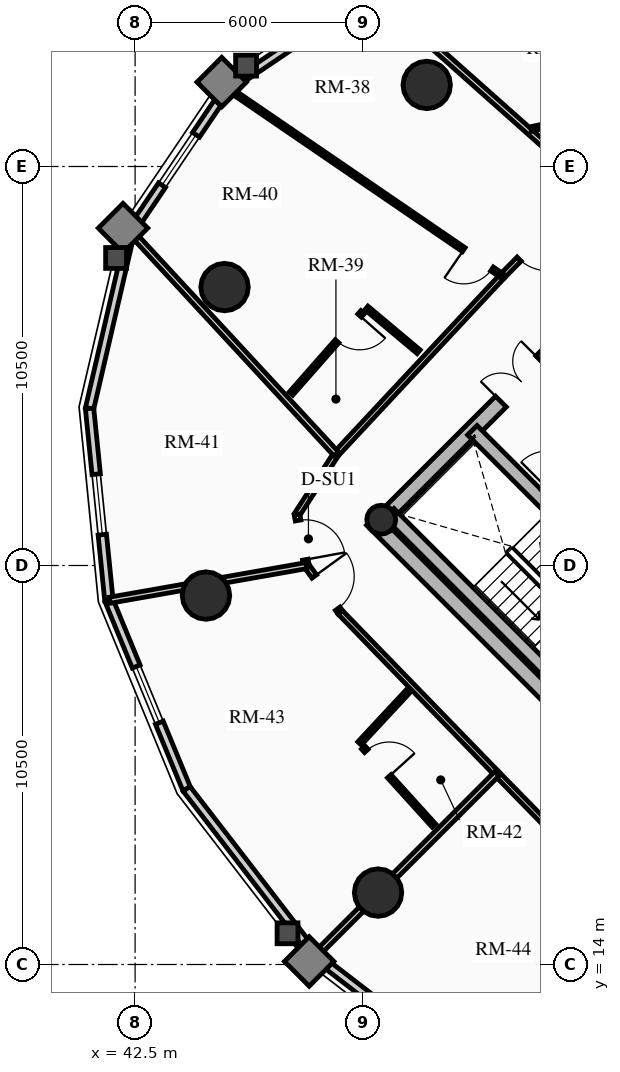
"""IFC4 building model, lengths in metres.
Left out: names, types, materials, properties, quantities, classifications, styles, units other than length and angle.
Written with IfcOpenShell. Run it as: python <this file> out.ifc"""

import sys

from ifc_helpers import new_model, si_unit, direction, frame, frame_2d, origin, origin_2d, place, context, subcontext, project, spatial, rectangle, circle, hollow_circle, extrude, source, transform, mapped, element, fill, save


model = new_model("IFC4")
c1 = context("Model", 3, precision=1e-05, world=origin(), true_north=direction((0.0, 1.0)))
c2 = subcontext(c1, "Body", "Model", "MODEL_VIEW")
j1 = project(units=[si_unit("LENGTHUNIT", "METRE"), si_unit("PLANEANGLEUNIT", "RADIAN")], contexts=[c1])
p1 = place(None, origin())
s1 = spatial("IfcSite", under=j1, at=p1, CompositionType="ELEMENT")
p2 = place(p1, origin())
s2 = spatial("IfcBuilding", under=s1, at=p2, CompositionType="ELEMENT")
p3 = place(p2, frame((0.0, 0.0, 151.6)))
s3 = spatial("IfcBuildingStorey", under=s2, at=p3, CompositionType="ELEMENT", Elevation=151.6)
p4 = place(p3, frame((58.702, 15.732, 0.0), z_axis=(0.0, 0.0, 1.0), x_axis=(-0.707106781187, 0.707106781187, 0.0)))
e1 = element("IfcWall", 1, at=p4, inside=s3, PredefinedType="SHEAR", context=c2, shape_type="SweptSolid", body=[
    extrude(rectangle(XDim=14.1, YDim=0.4, at=frame_2d((7.05, 0.0))), origin(), (0.0, 0.0, 1.0), 2.91),
])
p5 = place(p3, frame((48.873, 25.561, 0.0), z_axis=(0.0, 0.0, 1.0), x_axis=(0.707106781187, 0.707106781187, 0.0)))
e2 = element("IfcWall", 2, at=p5, inside=s3, PredefinedType="SHEAR", context=c2, shape_type="SweptSolid", body=[
    extrude(rectangle(XDim=10.7, YDim=0.4, at=frame_2d((5.35, 0.0))), origin(), (0.0, 0.0, 1.0), 2.91),
])
m1 = source(origin(), c2, "Body", "SweptSolid", [
    extrude(rectangle(XDim=1.5, YDim=2.02, at=frame_2d((0.75, 1.01))), frame((0.0, 0.21, 0.0), z_axis=(0.0, -1.0, 0.0), x_axis=(1.0, 0.0, 0.0)), (0.0, 0.0, 1.0), 0.42),
])
p6 = place(p5, frame((4.6, 0.0, 0.0)))
e3 = element("IfcOpeningElement", 3, at=p6, cuts=e2, PredefinedType="OPENING", context=c2, shape_type="MappedRepresentation", body=[
    mapped(m1, transform((0.0, 0.0, 0.0), x_axis=(1.0, 0.0, 0.0), y_axis=(0.0, 1.0, 0.0), z_axis=(0.0, 0.0, 1.0), scale=1.0)),
])
p7 = place(p3, frame((61.06, 18.373, 0.0), z_axis=(0.0, 0.0, 1.0), x_axis=(-0.707106781187, 0.707106781187, 0.0)))
e4 = element("IfcWall", 4, at=p7, inside=s3, PredefinedType="SHEAR", context=c2, shape_type="SweptSolid", body=[
    extrude(rectangle(XDim=13.7, YDim=0.35, at=frame_2d((6.85, 0.0))), origin(), (0.0, 0.0, 1.0), 2.91),
])
m2 = source(origin(), c2, "Body", "SweptSolid", [
    extrude(rectangle(XDim=1.1, YDim=2.015, at=frame_2d((0.55, 1.007))), frame((0.0, 0.185, 0.0), z_axis=(0.0, -1.0, 0.0), x_axis=(1.0, 0.0, 0.0)), (0.0, 0.0, 1.0), 0.37),
])
p8 = place(p7, frame((4.85, 0.0, 0.0)))
e5 = element("IfcOpeningElement", 5, at=p8, cuts=e4, PredefinedType="OPENING", context=c2, shape_type="MappedRepresentation", body=[
    mapped(m2, transform((0.0, 0.0, 0.0), x_axis=(1.0, 0.0, 0.0), y_axis=(0.0, 1.0, 0.0), z_axis=(0.0, 0.0, 1.0), scale=1.0)),
])
p9 = place(p7, frame((0.625, 0.0, 0.0)))
e6 = element("IfcOpeningElement", 6, at=p9, cuts=e4, PredefinedType="OPENING", context=c2, shape_type="MappedRepresentation", body=[
    mapped(m2, transform((0.0, 0.0, 0.0), x_axis=(1.0, 0.0, 0.0), y_axis=(0.0, 1.0, 0.0), z_axis=(0.0, 0.0, 1.0), scale=1.0)),
])
p10 = place(p7, frame((2.625, 0.0, 0.0)))
e7 = element("IfcOpeningElement", 7, at=p10, cuts=e4, PredefinedType="OPENING", context=c2, shape_type="MappedRepresentation", body=[
    mapped(m2, transform((0.0, 0.0, 0.0), x_axis=(1.0, 0.0, 0.0), y_axis=(0.0, 1.0, 0.0), z_axis=(0.0, 0.0, 1.0), scale=1.0)),
])
m3 = source(origin(), c2, "Body", "SweptSolid", [
    extrude(rectangle(XDim=1.15, YDim=2.02, at=frame_2d((0.575, 1.01))), frame((0.0, 0.185, 0.0), z_axis=(0.0, -1.0, 0.0), x_axis=(1.0, 0.0, 0.0)), (0.0, 0.0, 1.0), 0.37),
])
p11 = place(p7, frame((7.27, 0.0, 0.0)))
e8 = element("IfcOpeningElement", 8, at=p11, cuts=e4, PredefinedType="OPENING", context=c2, shape_type="MappedRepresentation", body=[
    mapped(m3, transform((0.0, 0.0, 0.0), x_axis=(1.0, 0.0, 0.0), y_axis=(0.0, 1.0, 0.0), z_axis=(0.0, 0.0, 1.0), scale=1.0)),
])
p12 = place(p3, frame((53.922, 21.141, 0.0), z_axis=(0.0, 0.0, 1.0), x_axis=(-0.707106781187, 0.707106781187, 0.0)))
e9 = element("IfcWall", 9, at=p12, inside=s3, PredefinedType="SHEAR", context=c2, shape_type="SweptSolid", body=[
    extrude(rectangle(XDim=6.695, YDim=0.35, at=frame_2d((3.348, 0.0))), origin(), (0.0, 0.0, 1.0), 2.91),
])
p13 = place(p3, frame((48.976, 25.706, 0.0), z_axis=(0.0, 0.0, 1.0), x_axis=(0.707106781187, 0.707106781187, 0.0)))
e10 = element("IfcColumn", 10, at=p13, inside=s3, PredefinedType="COLUMN", context=c2, shape_type="SweptSolid", body=[
    extrude(hollow_circle(Radius=0.38, WallThickness=0.032, at=origin_2d()), origin(), (0.0, 0.0, 1.0), 2.91),
])
for number, where, z_axis, x_axis in (
    (11, (50.173, 37.146, 0.0), (0.0, 0.0, 1.0), (1.0, 0.0, 0.0)),
    (12, (44.854, 31.827, 0.0), (0.0, 0.0, 1.0), (1.0, 0.0, 0.0)),
    (13, (44.365, 23.709, 0.0), (0.0, 0.0, 1.0), (1.0, 0.0, 0.0)),
    (14, (48.893, 15.893, 0.0), (0.0, 0.0, 1.0), (1.0, 0.0, 0.0)),
):
    element("IfcColumn", number, at=place(p3, frame(where, z_axis=z_axis, x_axis=x_axis)), inside=s3, PredefinedType="USERDEFINED", context=c2, shape_type="SweptSolid", body=[
        extrude(circle(Radius=0.625, at=origin_2d()), origin(), (0.0, 0.0, 1.0), 2.91),
    ])
p14 = place(p3, frame((44.935, 37.065, 0.0), z_axis=(0.0, 0.0, 1.0), x_axis=(0.828739009952, 0.559635286042, 0.0)))
e15 = element("IfcWall", 15, at=p14, inside=s3, PredefinedType="SOLIDWALL", context=c2, shape_type="SweptSolid", body=[
    extrude(rectangle(XDim=4.569, YDim=0.22, at=frame_2d((2.284, 0.0))), origin(), (0.0, 0.0, 1.0), 2.245),
])
p15 = place(p3, frame((42.378, 33.279, 0.0), z_axis=(0.0, 0.0, 1.0), x_axis=(0.559635286042, 0.828739009952, 0.0)))
e16 = element("IfcWall", 16, at=p15, inside=s3, PredefinedType="SOLIDWALL", context=c2, shape_type="SweptSolid", body=[
    extrude(rectangle(XDim=4.569, YDim=0.22, at=frame_2d((2.284, 0.0))), origin(), (0.0, 0.0, 1.0), 2.245),
])
m4 = source(origin(), c2, "Body", "SweptSolid", [
    extrude(rectangle(XDim=1.6, YDim=1.3, at=frame_2d((0.8, 0.65))), frame((0.0, 0.12, 0.0), z_axis=(0.0, -1.0, 0.0), x_axis=(1.0, 0.0, 0.0)), (0.0, 0.0, 1.0), 0.24),
])
p16 = place(p15, frame((1.484, 0.0, 0.65)))
e17 = element("IfcOpeningElement", 17, at=p16, cuts=e16, PredefinedType="OPENING", context=c2, shape_type="MappedRepresentation", body=[
    mapped(m4, transform((0.0, 0.0, 0.0), x_axis=(1.0, 0.0, 0.0), y_axis=(0.0, 1.0, 0.0), z_axis=(0.0, 0.0, 1.0), scale=1.0)),
])
p17 = place(p3, frame((41.302, 28.633, 0.0), z_axis=(0.0, 0.0, 1.0), x_axis=(0.225659540039, 0.974206226622, 0.0)))
e18 = element("IfcWall", 18, at=p17, inside=s3, PredefinedType="SOLIDWALL", context=c2, shape_type="SweptSolid", body=[
    extrude(rectangle(XDim=4.769, YDim=0.22, at=frame_2d((2.385, 0.0))), origin(), (0.0, 0.0, 1.0), 2.245),
])
p18 = place(p3, frame((41.811, 23.582, 0.0), z_axis=(0.0, 0.0, 1.0), x_axis=(-0.100279889424, 0.994959267396, 0.0)))
e19 = element("IfcWall", 19, at=p18, inside=s3, PredefinedType="SOLIDWALL", context=c2, shape_type="SweptSolid", body=[
    extrude(rectangle(XDim=5.076, YDim=0.22, at=frame_2d((2.538, 0.0))), origin(), (0.0, 0.0, 1.0), 2.245),
])
p19 = place(p18, frame((1.738, 0.0, 0.65)))
e20 = element("IfcOpeningElement", 20, at=p19, cuts=e19, PredefinedType="OPENING", context=c2, shape_type="MappedRepresentation", body=[
    mapped(m4, transform((0.0, 0.0, 0.0), x_axis=(1.0, 0.0, 0.0), y_axis=(0.0, 1.0, 0.0), z_axis=(0.0, 0.0, 1.0), scale=1.0)),
])
p20 = place(p3, frame((43.856, 18.622, 0.0), z_axis=(0.0, 0.0, 1.0), x_axis=(-0.38111364655, 0.924528197738, 0.0)))
e21 = element("IfcWall", 21, at=p20, inside=s3, PredefinedType="SOLIDWALL", context=c2, shape_type="SweptSolid", body=[
    extrude(rectangle(XDim=5.366, YDim=0.22, at=frame_2d((2.683, 0.0))), origin(), (0.0, 0.0, 1.0), 2.245),
])
p21 = place(p20, frame((1.883, 0.0, 0.65)))
e22 = element("IfcOpeningElement", 22, at=p21, cuts=e21, PredefinedType="OPENING", context=c2, shape_type="MappedRepresentation", body=[
    mapped(m4, transform((0.0, 0.0, 0.0), x_axis=(1.0, 0.0, 0.0), y_axis=(0.0, 1.0, 0.0), z_axis=(0.0, 0.0, 1.0), scale=1.0)),
])
p22 = place(p3, frame((47.236, 14.236, 0.0), z_axis=(0.0, 0.0, 1.0), x_axis=(-0.610543584779, 0.791982658323, 0.0)))
e23 = element("IfcWall", 23, at=p22, inside=s3, PredefinedType="SOLIDWALL", context=c2, shape_type="SweptSolid", body=[
    extrude(rectangle(XDim=5.537, YDim=0.22, at=frame_2d((2.769, 0.0))), origin(), (0.0, 0.0, 1.0), 2.245),
])
p23 = place(p3, frame((51.622, 10.856, 0.0), z_axis=(0.0, 0.0, 1.0), x_axis=(-0.791982658323, 0.610543584779, 0.0)))
e24 = element("IfcWall", 24, at=p23, inside=s3, PredefinedType="SOLIDWALL", context=c2, shape_type="SweptSolid", body=[
    extrude(rectangle(XDim=5.537, YDim=0.22, at=frame_2d((2.769, 0.0))), origin(), (0.0, 0.0, 1.0), 2.245),
])
p24 = place(p23, frame((1.968, 0.0, 0.65)))
e25 = element("IfcOpeningElement", 25, at=p24, cuts=e24, PredefinedType="OPENING", context=c2, shape_type="MappedRepresentation", body=[
    mapped(m4, transform((0.0, 0.0, 0.0), x_axis=(1.0, 0.0, 0.0), y_axis=(0.0, 1.0, 0.0), z_axis=(0.0, 0.0, 1.0), scale=1.0)),
])
p25 = place(p3, frame((54.501, 34.479, 0.0), z_axis=(0.0, 0.0, 1.0), x_axis=(-0.70346073929, -0.710734119258, 0.0)))
e26 = element("IfcWall", 26, at=p25, inside=s3, PredefinedType="PARTITIONING", context=c2, shape_type="SweptSolid", body=[
    extrude(rectangle(XDim=3.323, YDim=0.15, at=frame_2d((1.662, 0.0))), origin(), (0.0, 0.0, 1.0), 2.245),
])
m5 = source(origin(), c2, "Body", "SweptSolid", [
    extrude(rectangle(XDim=1.05, YDim=2.015, at=frame_2d((0.525, 1.007))), frame((0.0, 0.085, 0.0), z_axis=(0.0, -1.0, 0.0), x_axis=(1.0, 0.0, 0.0)), (0.0, 0.0, 1.0), 0.17),
])
p26 = place(p25, frame((1.645, 0.0, 0.0)))
e27 = element("IfcOpeningElement", 27, at=p26, cuts=e26, PredefinedType="OPENING", context=c2, shape_type="MappedRepresentation", body=[
    mapped(m5, transform((0.0, 0.0, 0.0), x_axis=(1.0, 0.0, 0.0), y_axis=(0.0, 1.0, 0.0), z_axis=(0.0, 0.0, 1.0), scale=1.0)),
])
p27 = place(p3, frame((52.163, 32.117, 0.0), z_axis=(0.0, 0.0, 1.0), x_axis=(-0.682485296115, -0.730899323154, 0.0)))
e28 = element("IfcWall", 28, at=p27, inside=s3, PredefinedType="PARTITIONING", context=c2, shape_type="SweptSolid", body=[
    extrude(rectangle(XDim=6.404, YDim=0.15, at=frame_2d((3.202, 0.0))), origin(), (0.0, 0.0, 1.0), 2.245),
])
p28 = place(p3, frame((47.792, 27.436, 0.0), z_axis=(0.0, 0.0, 1.0), x_axis=(-0.543086162542, -0.839676973637, 0.0)))
e29 = element("IfcWall", 29, at=p28, inside=s3, PredefinedType="PARTITIONING", context=c2, shape_type="SweptSolid", body=[
    extrude(rectangle(XDim=1.901, YDim=0.15, at=frame_2d((0.95, 0.0))), origin(), (0.0, 0.0, 1.0), 2.245),
])
p29 = place(p3, frame((46.76, 25.84, 0.0), z_axis=(0.0, 0.0, 1.0), x_axis=(0.181230731673, -0.983440604153, 0.0)))
e30 = element("IfcWall", 30, at=p29, inside=s3, PredefinedType="PARTITIONING", context=c2, shape_type="SweptSolid", body=[
    extrude(rectangle(XDim=1.365, YDim=0.15, at=frame_2d((0.682, 0.0))), origin(), (0.0, 0.0, 1.0), 2.245),
])
p30 = place(p29, frame((0.157, 0.0, 0.0)))
e31 = element("IfcOpeningElement", 31, at=p30, cuts=e30, PredefinedType="OPENING", context=c2, shape_type="MappedRepresentation", body=[
    mapped(m5, transform((0.0, 0.0, 0.0), x_axis=(1.0, 0.0, 0.0), y_axis=(0.0, 1.0, 0.0), z_axis=(0.0, 0.0, 1.0), scale=1.0)),
])
p31 = place(p3, frame((47.008, 24.498, 0.0), z_axis=(0.0, 0.0, 1.0), x_axis=(0.586941299514, -0.809629489906, 0.0)))
e32 = element("IfcWall", 32, at=p31, inside=s3, PredefinedType="PARTITIONING", context=c2, shape_type="SweptSolid", body=[
    extrude(rectangle(XDim=1.523, YDim=0.15, at=frame_2d((0.761, 0.0))), origin(), (0.0, 0.0, 1.0), 2.245),
])
p32 = place(p31, frame((0.353, 0.0, 0.0)))
e33 = element("IfcOpeningElement", 33, at=p32, cuts=e32, PredefinedType="OPENING", context=c2, shape_type="MappedRepresentation", body=[
    mapped(m5, transform((0.0, 0.0, 0.0), x_axis=(1.0, 0.0, 0.0), y_axis=(0.0, 1.0, 0.0), z_axis=(0.0, 0.0, 1.0), scale=1.0)),
])
p33 = place(p3, frame((47.901, 23.265, 0.0), z_axis=(0.0, 0.0, 1.0), x_axis=(0.696355965374, -0.717696572019, 0.0)))
e34 = element("IfcWall", 34, at=p33, inside=s3, PredefinedType="PARTITIONING", context=c2, shape_type="SweptSolid", body=[
    extrude(rectangle(XDim=5.915, YDim=0.15, at=frame_2d((2.957, 0.0))), origin(), (0.0, 0.0, 1.0), 2.675),
])
p34 = place(p3, frame((52.02, 19.02, 0.0), z_axis=(0.0, 0.0, 1.0), x_axis=(0.699456449804, -0.71467522332, 0.0)))
e35 = element("IfcWall", 35, at=p34, inside=s3, PredefinedType="PARTITIONING", context=c2, shape_type="SweptSolid", body=[
    extrude(rectangle(XDim=6.032, YDim=0.15, at=frame_2d((3.016, 0.0))), origin(), (0.0, 0.0, 1.0), 2.245),
])
p35 = place(p3, frame((54.501, 34.479, 0.0), z_axis=(0.0, 0.0, 1.0), x_axis=(-0.747641382601, 0.66410267506, 0.0)))
e36 = element("IfcWall", 36, at=p35, inside=s3, PredefinedType="PARTITIONING", context=c2, shape_type="SweptSolid", body=[
    extrude(rectangle(XDim=7.718, YDim=0.16, at=frame_2d((3.859, 0.0))), origin(), (0.0, 0.0, 1.0), 2.245),
])
p36 = place(p3, frame((47.792, 27.436, 0.0), z_axis=(0.0, 0.0, 1.0), x_axis=(-0.679077160958, 0.734066897132, 0.0)))
e37 = element("IfcWall", 37, at=p36, inside=s3, PredefinedType="PARTITIONING", context=c2, shape_type="SweptSolid", body=[
    extrude(rectangle(XDim=7.947, YDim=0.16, at=frame_2d((3.974, 0.0))), origin(), (0.0, 0.0, 1.0), 2.245),
])
p37 = place(p3, frame((47.008, 24.498, 0.0), z_axis=(0.0, 0.0, 1.0), x_axis=(-0.984823741496, -0.173557478046, 0.0)))
e38 = element("IfcWall", 38, at=p37, inside=s3, PredefinedType="PARTITIONING", context=c2, shape_type="SweptSolid", body=[
    extrude(rectangle(XDim=5.257, YDim=0.16, at=frame_2d((2.628, 0.0))), origin(), (0.0, 0.0, 1.0), 2.245),
])
p38 = place(p3, frame((52.02, 19.02, 0.0), z_axis=(0.0, 0.0, 1.0), x_axis=(-0.707106781187, -0.707106781187, 0.0)))
e39 = element("IfcWall", 39, at=p38, inside=s3, PredefinedType="PARTITIONING", context=c2, shape_type="SweptSolid", body=[
    extrude(rectangle(XDim=6.745, YDim=0.16, at=frame_2d((3.373, 0.0))), origin(), (0.0, 0.0, 1.0), 2.245),
])
p39 = place(p3, frame((54.858, 36.425, 0.0), z_axis=(0.0, 0.0, 1.0), x_axis=(-0.975061820415, -0.221933427785, 0.0)))
e40 = element("IfcWall", 40, at=p39, inside=s3, PredefinedType="PARTITIONING", context=c2, shape_type="SweptSolid", body=[
    extrude(rectangle(XDim=1.993, YDim=0.125, at=frame_2d((0.997, 0.0))), origin(), (0.0, 0.0, 1.0), 2.312),
])
m6 = source(origin(), c2, "Body", "SweptSolid", [
    extrude(rectangle(XDim=0.9, YDim=2.005, at=frame_2d((0.45, 1.002))), frame((0.0, 0.073, 0.0), z_axis=(0.0, -1.0, 0.0), x_axis=(1.0, 0.0, 0.0)), (0.0, 0.0, 1.0), 0.145),
])
p40 = place(p39, frame((0.44, 0.0, 0.0)))
e41 = element("IfcOpeningElement", 41, at=p40, cuts=e40, PredefinedType="OPENING", context=c2, shape_type="MappedRepresentation", body=[
    mapped(m6, transform((0.0, 0.0, 0.0), x_axis=(1.0, 0.0, 0.0), y_axis=(0.0, 1.0, 0.0), z_axis=(0.0, 0.0, 1.0), scale=1.0)),
])
p41 = place(p3, frame((52.163, 32.117, 0.0), z_axis=(0.0, 0.0, 1.0), x_axis=(-0.825403853282, 0.564542716707, 0.0)))
e42 = element("IfcWall", 42, at=p41, inside=s3, PredefinedType="PARTITIONING", context=c2, shape_type="SweptSolid", body=[
    extrude(rectangle(XDim=8.74, YDim=0.125, at=frame_2d((4.37, 0.0))), origin(), (0.0, 0.0, 1.0), 2.245),
])
p42 = place(p41, frame((0.33, 0.0, 0.0)))
e43 = element("IfcOpeningElement", 43, at=p42, cuts=e42, PredefinedType="OPENING", context=c2, shape_type="MappedRepresentation", body=[
    mapped(m6, transform((0.0, 0.0, 0.0), x_axis=(1.0, 0.0, 0.0), y_axis=(0.0, 1.0, 0.0), z_axis=(0.0, 0.0, 1.0), scale=1.0)),
])
p43 = place(p3, frame((49.961, 30.124, 0.0), z_axis=(0.0, 0.0, 1.0), x_axis=(-0.766210982885, 0.64258908309, 0.0)))
e44 = element("IfcWall", 44, at=p43, inside=s3, PredefinedType="PARTITIONING", context=c2, shape_type="SweptSolid", body=[
    extrude(rectangle(XDim=1.795, YDim=0.125, at=frame_2d((0.897, 0.0))), origin(), (0.0, 0.0, 1.0), 2.675),
])
p44 = place(p3, frame((48.488, 31.166, 0.0), z_axis=(0.0, 0.0, 1.0), x_axis=(-0.660635615229, -0.750706722956, 0.0)))
e45 = element("IfcWall", 45, at=p44, inside=s3, PredefinedType="PARTITIONING", context=c2, shape_type="SweptSolid", body=[
    extrude(rectangle(XDim=2.852, YDim=0.125, at=frame_2d((1.426, 0.0))), origin(), (0.0, 0.0, 1.0), 2.245),
])
p45 = place(p44, frame((0.12, 0.0, 0.0)))
e46 = element("IfcOpeningElement", 46, at=p45, cuts=e45, PredefinedType="OPENING", context=c2, shape_type="MappedRepresentation", body=[
    mapped(m6, transform((0.0, 0.0, 0.0), x_axis=(1.0, 0.0, 0.0), y_axis=(0.0, 1.0, 0.0), z_axis=(0.0, 0.0, 1.0), scale=1.0)),
])
p46 = place(p3, frame((49.665, 21.171, 0.0), z_axis=(0.0, 0.0, 1.0), x_axis=(-0.681089123144, -0.73220052331, 0.0)))
e47 = element("IfcWall", 47, at=p46, inside=s3, PredefinedType="PARTITIONING", context=c2, shape_type="SweptSolid", body=[
    extrude(rectangle(XDim=1.849, YDim=0.125, at=frame_2d((0.924, 0.0))), origin(), (0.0, 0.0, 1.0), 2.675),
])
p47 = place(p3, frame((48.503, 19.711, 0.0), z_axis=(0.0, 0.0, 1.0), x_axis=(0.671201050003, -0.741275354018, 0.0)))
e48 = element("IfcWall", 48, at=p47, inside=s3, PredefinedType="PARTITIONING", context=c2, shape_type="SweptSolid", body=[
    extrude(rectangle(XDim=2.777, YDim=0.125, at=frame_2d((1.388, 0.0))), origin(), (0.0, 0.0, 1.0), 2.675),
])
p48 = place(p47, frame((0.12, 0.0, 0.0)))
e49 = element("IfcOpeningElement", 49, at=p48, cuts=e48, PredefinedType="OPENING", context=c2, shape_type="MappedRepresentation", body=[
    mapped(m6, transform((0.0, 0.0, 0.0), x_axis=(1.0, 0.0, 0.0), y_axis=(0.0, 1.0, 0.0), z_axis=(0.0, 0.0, 1.0), scale=1.0)),
])
m7 = source(origin(), c2, "Body", "SweptSolid", [
    extrude(rectangle(XDim=1.6, YDim=1.3, at=frame_2d((0.8, 0.65))), frame((0.0, 0.03, 0.0), z_axis=(0.0, -1.0, 0.0), x_axis=(1.0, 0.0, 0.0)), (0.0, 0.0, 1.0), 0.06),
])
p49 = place(p16, origin())
e50 = element("IfcWindow", 50, at=p49, inside=s3, PartitioningType="SINGLE_PANEL", PredefinedType="WINDOW", context=c2, shape_type="MappedRepresentation", body=[
    mapped(m7, transform((0.0, 0.0, 0.0), x_axis=(1.0, 0.0, 0.0), y_axis=(0.0, 1.0, 0.0), z_axis=(0.0, 0.0, 1.0), scale=1.0)),
])
fill(e17, e50)
p50 = place(p19, origin())
e51 = element("IfcWindow", 51, at=p50, inside=s3, PartitioningType="SINGLE_PANEL", PredefinedType="WINDOW", context=c2, shape_type="MappedRepresentation", body=[
    mapped(m7, transform((0.0, 0.0, 0.0), x_axis=(1.0, 0.0, 0.0), y_axis=(0.0, 1.0, 0.0), z_axis=(0.0, 0.0, 1.0), scale=1.0)),
])
fill(e20, e51)
p51 = place(p21, origin())
e52 = element("IfcWindow", 52, at=p51, inside=s3, PartitioningType="SINGLE_PANEL", PredefinedType="WINDOW", context=c2, shape_type="MappedRepresentation", body=[
    mapped(m7, transform((0.0, 0.0, 0.0), x_axis=(1.0, 0.0, 0.0), y_axis=(0.0, 1.0, 0.0), z_axis=(0.0, 0.0, 1.0), scale=1.0)),
])
fill(e22, e52)
m8 = source(origin(), c2, "Body", "SweptSolid", [
    extrude(rectangle(XDim=1.5, YDim=2.02, at=frame_2d((0.75, 1.01))), frame((0.0, 0.025, 0.0), z_axis=(0.0, -1.0, 0.0), x_axis=(1.0, 0.0, 0.0)), (0.0, 0.0, 1.0), 0.05),
])
p52 = place(p6, origin())
e53 = element("IfcDoor", 53, at=p52, inside=s3, OperationType="DOUBLE_DOOR_SINGLE_SWING", PredefinedType="DOOR", context=c2, shape_type="MappedRepresentation", body=[
    mapped(m8, transform((0.0, 0.0, 0.0), x_axis=(1.0, 0.0, 0.0), y_axis=(0.0, 1.0, 0.0), z_axis=(0.0, 0.0, 1.0), scale=1.0)),
])
fill(e3, e53)
m9 = source(origin(), c2, "Body", "SweptSolid", [
    extrude(rectangle(XDim=1.05, YDim=2.015, at=frame_2d((0.525, 1.007))), frame((0.0, 0.025, 0.0), z_axis=(0.0, -1.0, 0.0), x_axis=(1.0, 0.0, 0.0)), (0.0, 0.0, 1.0), 0.05),
])
p53 = place(p26, origin())
e54 = element("IfcDoor", 54, at=p53, inside=s3, OperationType="SINGLE_SWING_LEFT", PredefinedType="DOOR", context=c2, shape_type="MappedRepresentation", body=[
    mapped(m9, transform((0.0, 0.0, 0.0), x_axis=(1.0, 0.0, 0.0), y_axis=(0.0, 1.0, 0.0), z_axis=(0.0, 0.0, 1.0), scale=1.0)),
])
fill(e27, e54)
m10 = source(origin(), c2, "Body", "SweptSolid", [
    extrude(rectangle(XDim=0.9, YDim=2.005, at=frame_2d((0.45, 1.002))), frame((0.0, 0.025, 0.0), z_axis=(0.0, -1.0, 0.0), x_axis=(1.0, 0.0, 0.0)), (0.0, 0.0, 1.0), 0.05),
])
p54 = place(p42, origin())
e55 = element("IfcDoor", 55, at=p54, inside=s3, OperationType="SINGLE_SWING_RIGHT", PredefinedType="DOOR", context=c2, shape_type="MappedRepresentation", body=[
    mapped(m10, transform((0.0, 0.0, 0.0), x_axis=(1.0, 0.0, 0.0), y_axis=(0.0, 1.0, 0.0), z_axis=(0.0, 0.0, 1.0), scale=1.0)),
])
fill(e43, e55)
p55 = place(p45, origin())
e56 = element("IfcDoor", 56, at=p55, inside=s3, OperationType="SINGLE_SWING_LEFT", PredefinedType="DOOR", context=c2, shape_type="MappedRepresentation", body=[
    mapped(m10, transform((0.0, 0.0, 0.0), x_axis=(1.0, 0.0, 0.0), y_axis=(0.0, 1.0, 0.0), z_axis=(0.0, 0.0, 1.0), scale=1.0)),
])
fill(e46, e56)
p56 = place(p30, origin())
e57 = element("IfcDoor", 57, at=p56, inside=s3, OperationType="SINGLE_SWING_RIGHT", PredefinedType="DOOR", context=c2, shape_type="MappedRepresentation", body=[
    mapped(m9, transform((0.0, 0.0, 0.0), x_axis=(1.0, 0.0, 0.0), y_axis=(0.0, 1.0, 0.0), z_axis=(0.0, 0.0, 1.0), scale=1.0)),
])
fill(e31, e57)
p57 = place(p32, origin())
e58 = element("IfcDoor", 58, at=p57, inside=s3, OperationType="SINGLE_SWING_LEFT", PredefinedType="DOOR", context=c2, shape_type="MappedRepresentation", body=[
    mapped(m9, transform((0.0, 0.0, 0.0), x_axis=(1.0, 0.0, 0.0), y_axis=(0.0, 1.0, 0.0), z_axis=(0.0, 0.0, 1.0), scale=1.0)),
])
fill(e33, e58)
p58 = place(p48, origin())
e59 = element("IfcDoor", 59, at=p58, inside=s3, OperationType="SINGLE_SWING_RIGHT", PredefinedType="DOOR", context=c2, shape_type="MappedRepresentation", body=[
    mapped(m10, transform((0.0, 0.0, 0.0), x_axis=(1.0, 0.0, 0.0), y_axis=(0.0, 1.0, 0.0), z_axis=(0.0, 0.0, 1.0), scale=1.0)),
])
fill(e49, e59)
save(model, sys.argv[1])
